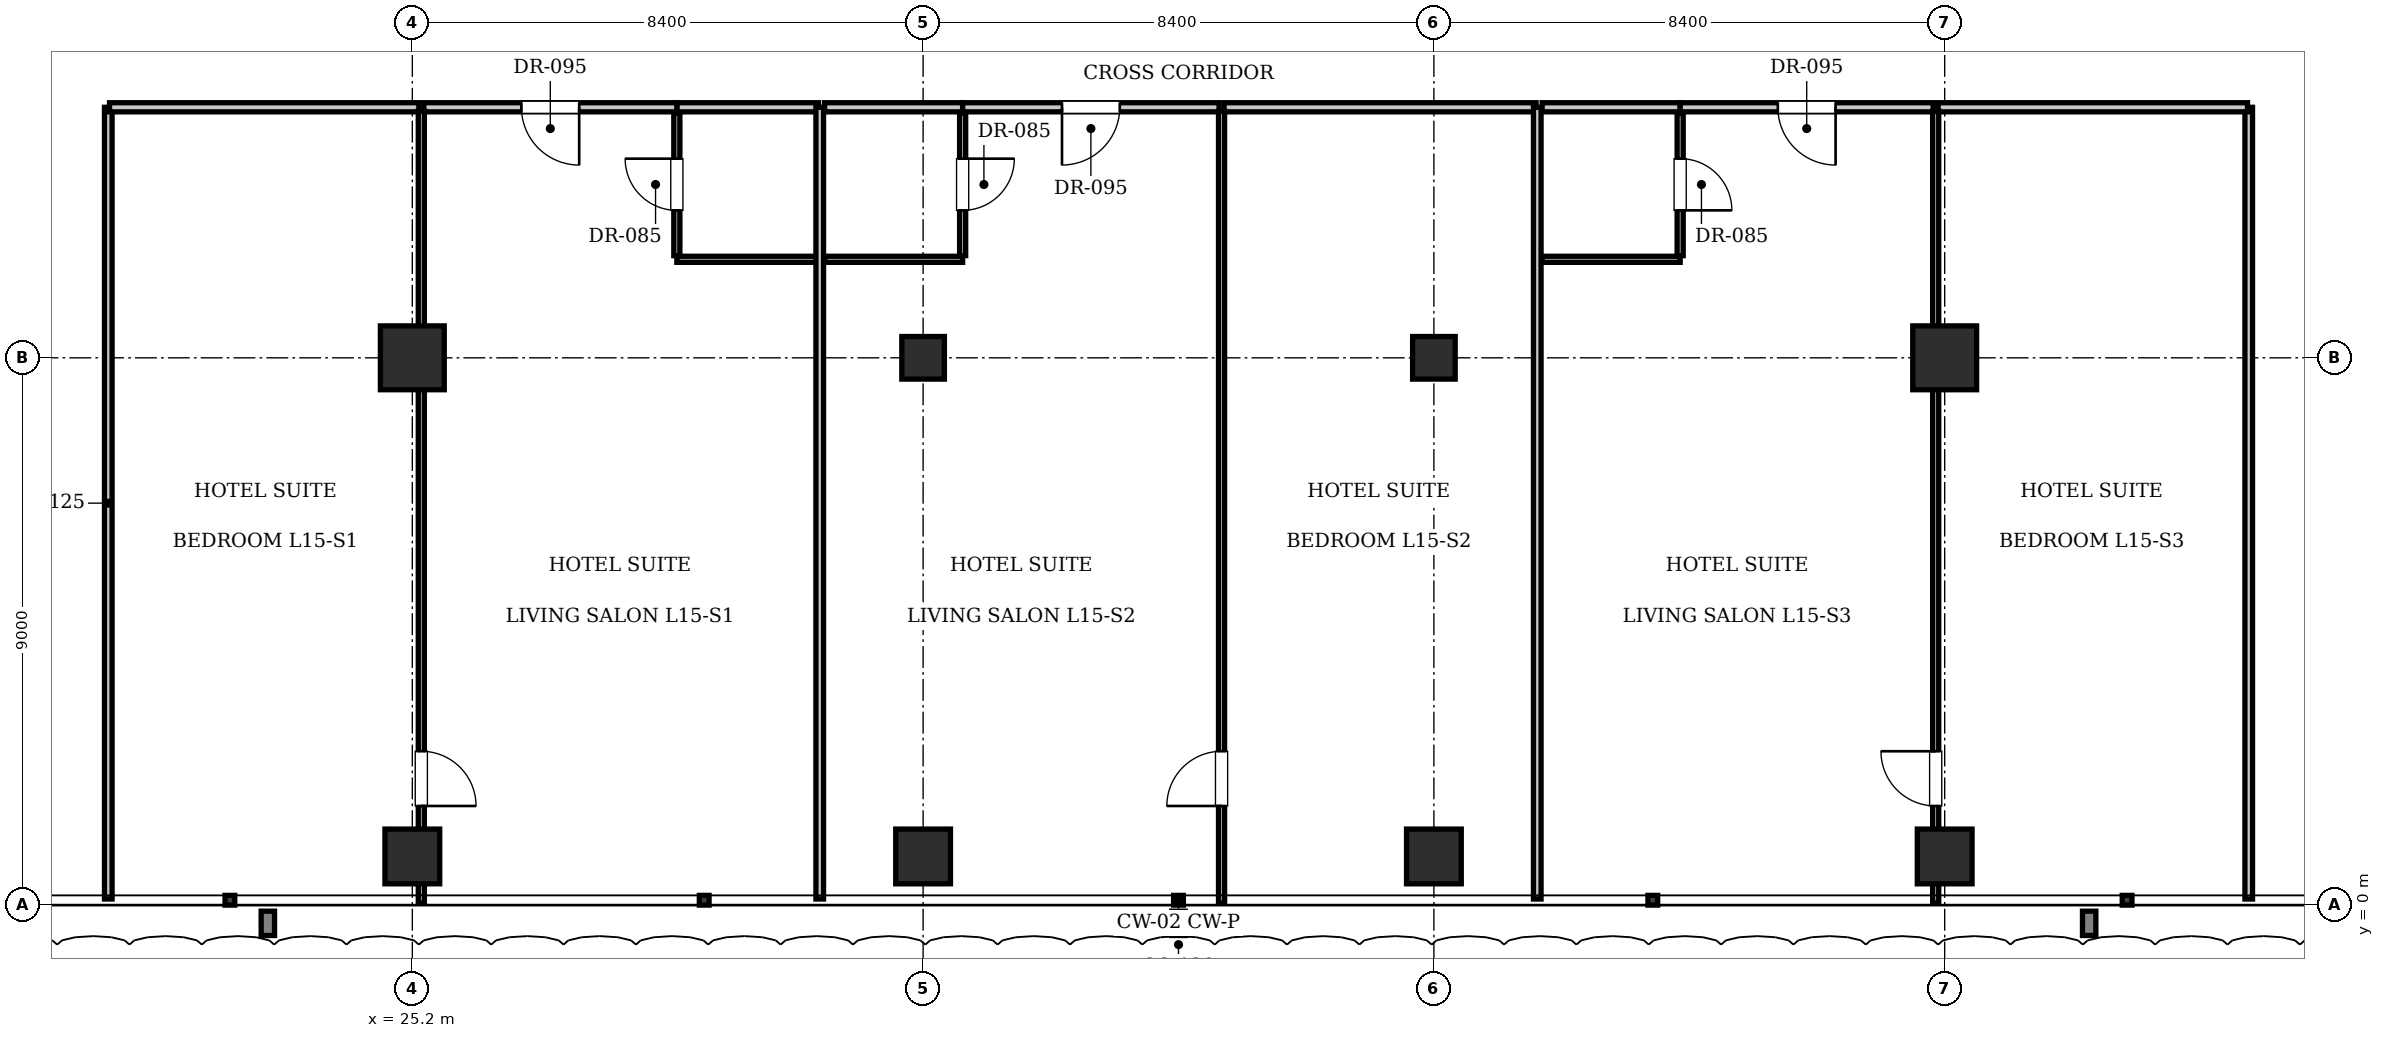
"""IFC4 building model, lengths in metres.
Left out: names, types, materials, properties, quantities, classifications, styles, units other than length and angle.
Written with IfcOpenShell. Run it as: python <this file> out.ifc"""

import sys

from ifc_helpers import new_model, si_unit, direction, frame, frame_2d, origin, origin_2d, place, context, subcontext, project, spatial, rectangle, i_section, extrude, element, fill, save


model = new_model("IFC4")
c1 = context("Model", 3, precision=1e-05, world=origin(), true_north=direction((0.0, 1.0)))
c2 = subcontext(c1, "Body", "Model", "MODEL_VIEW")
j1 = project(units=[si_unit("LENGTHUNIT", "METRE"), si_unit("PLANEANGLEUNIT", "RADIAN")], contexts=[c1])
p1 = place(None, origin())
s1 = spatial("IfcSite", under=j1, at=p1, CompositionType="ELEMENT")
p2 = place(p1, origin())
s2 = spatial("IfcBuilding", under=s1, at=p2, CompositionType="ELEMENT")
p3 = place(p2, frame((0.0, 0.0, 65.45)))
s3 = spatial("IfcBuildingStorey", under=s2, at=p3, CompositionType="ELEMENT", Elevation=65.45)
for number, where, z_axis, x_axis in (
    (1, (25.2, 9.0, 0.0), (0.0, 0.0, 1.0), (1.0, 0.0, 0.0)),
    (2, (50.4, 9.0, 0.0), (0.0, 0.0, 1.0), (1.0, 0.0, 0.0)),
):
    element("IfcColumn", number, at=place(p3, frame(where, z_axis=z_axis, x_axis=x_axis)), inside=s3, PredefinedType="COLUMN", context=c2, shape_type="SweptSolid", body=[
        extrude(rectangle(XDim=1.05, YDim=1.05, at=origin_2d()), origin(), (0.0, 0.0, 1.0), 3.85),
    ])
for number, where, z_axis, x_axis in (
    (3, (33.6, 9.0, 0.0), (0.0, 0.0, 1.0), (1.0, 0.0, 0.0)),
    (4, (42.0, 9.0, 0.0), (0.0, 0.0, 1.0), (1.0, 0.0, 0.0)),
):
    element("IfcColumn", number, at=place(p3, frame(where, z_axis=z_axis, x_axis=x_axis)), inside=s3, PredefinedType="COLUMN", context=c2, shape_type="SweptSolid", body=[
        extrude(i_section(OverallWidth=0.7, OverallDepth=0.7, WebThickness=0.028, FlangeThickness=0.044, at=origin_2d()), origin(), (0.0, 0.0, 1.0), 3.85),
    ])
for number, where, z_axis, x_axis in (
    (5, (25.2, 0.8, 0.0), (0.0, 0.0, 1.0), (1.0, 0.0, 0.0)),
    (6, (33.6, 0.8, 0.0), (0.0, 0.0, 1.0), (1.0, 0.0, 0.0)),
    (7, (42.0, 0.8, 0.0), (0.0, 0.0, 1.0), (1.0, 0.0, 0.0)),
    (8, (50.4, 0.8, 0.0), (0.0, 0.0, 1.0), (1.0, 0.0, 0.0)),
):
    element("IfcColumn", number, at=place(p3, frame(where, z_axis=z_axis, x_axis=x_axis)), inside=s3, PredefinedType="COLUMN", context=c2, shape_type="SweptSolid", body=[
        extrude(rectangle(XDim=0.9, YDim=0.9, at=origin_2d()), origin(), (0.0, 0.0, 1.0), 3.85),
    ])
for number, where, z_axis, x_axis in (
    (9, (20.2, 0.1, 0.0), (0.0, 0.0, 1.0), (0.0, 1.0, 0.0)),
    (10, (55.4, 0.1, 0.0), (0.0, 0.0, 1.0), (0.0, 1.0, 0.0)),
):
    element("IfcWall", number, at=place(p3, frame(where, z_axis=z_axis, x_axis=x_axis)), inside=s3, PredefinedType="PARTITIONING", context=c2, shape_type="SweptSolid", body=[
        extrude(rectangle(XDim=13.02, YDim=0.125, at=frame_2d((6.51, 0.0))), origin(), (0.0, 0.0, 1.0), 3.61),
    ])
p4 = place(p3, frame((29.55, 13.12, 0.0), z_axis=(0.0, 0.0, 1.0), x_axis=(1.0, 0.0, 0.0)))
e11 = element("IfcWall", 11, at=p4, inside=s3, PredefinedType="PARTITIONING", context=c2, shape_type="SweptSolid", body=[
    extrude(rectangle(XDim=2.33, YDim=0.15, at=frame_2d((1.165, 0.0))), origin(), (0.0, 0.0, 1.0), 3.61),
])
p5 = place(p3, frame((29.55, 10.62, 0.0), z_axis=(0.0, 0.0, 1.0), x_axis=(1.0, 0.0, 0.0)))
e12 = element("IfcWall", 12, at=p5, inside=s3, PredefinedType="PARTITIONING", context=c2, shape_type="SweptSolid", body=[
    extrude(rectangle(XDim=2.31, YDim=0.1, at=frame_2d((1.155, 0.0))), origin(), (0.0, 0.0, 1.0), 3.61),
])
p6 = place(p3, frame((29.55, 10.68, 0.0), z_axis=(0.0, 0.0, 1.0), x_axis=(0.0, 1.0, 0.0)))
e13 = element("IfcWall", 13, at=p6, inside=s3, PredefinedType="PARTITIONING", context=c2, shape_type="SweptSolid", body=[
    extrude(rectangle(XDim=2.34, YDim=0.1, at=frame_2d((1.17, 0.0))), origin(), (0.0, 0.0, 1.0), 3.61),
])
p7 = place(p6, frame((0.745, 0.0, 0.0)))
e14 = element("IfcOpeningElement", 14, at=p7, cuts=e13, PredefinedType="OPENING", context=c2, shape_type="SweptSolid", body=[
    extrude(rectangle(XDim=0.85, YDim=2.1, at=frame_2d((0.425, 1.05))), frame((0.0, 0.06, 0.0), z_axis=(0.0, -1.0, 0.0), x_axis=(1.0, 0.0, 0.0)), (0.0, 0.0, 1.0), 0.12),
])
p8 = place(p3, frame((20.22, 13.12, 0.0), z_axis=(0.0, 0.0, 1.0), x_axis=(1.0, 0.0, 0.0)))
e15 = element("IfcWall", 15, at=p8, inside=s3, PredefinedType="PARTITIONING", context=c2, shape_type="SweptSolid", body=[
    extrude(rectangle(XDim=5.088, YDim=0.15, at=frame_2d((2.544, 0.0))), origin(), (0.0, 0.0, 1.0), 3.61),
])
p9 = place(p3, frame((25.388, 13.12, 0.0), z_axis=(0.0, 0.0, 1.0), x_axis=(1.0, 0.0, 0.0)))
e16 = element("IfcWall", 16, at=p9, inside=s3, PredefinedType="PARTITIONING", context=c2, shape_type="SweptSolid", body=[
    extrude(rectangle(XDim=4.162, YDim=0.15, at=frame_2d((2.081, 0.0))), origin(), (0.0, 0.0, 1.0), 3.61),
])
p10 = place(p9, frame((1.606, 0.0, 0.0)))
e17 = element("IfcOpeningElement", 17, at=p10, cuts=e16, PredefinedType="OPENING", context=c2, shape_type="SweptSolid", body=[
    extrude(rectangle(XDim=0.95, YDim=2.15, at=frame_2d((0.475, 1.075))), frame((0.0, 0.085, 0.0), z_axis=(0.0, -1.0, 0.0), x_axis=(1.0, 0.0, 0.0)), (0.0, 0.0, 1.0), 0.17),
])
p11 = place(p3, frame((25.348, 0.03, 0.0), z_axis=(0.0, 0.0, 1.0), x_axis=(0.0, 1.0, 0.0)))
e18 = element("IfcWall", 18, at=p11, inside=s3, PredefinedType="PARTITIONING", context=c2, shape_type="SweptSolid", body=[
    extrude(rectangle(XDim=13.03, YDim=0.1, at=frame_2d((6.515, 0.0))), origin(), (0.0, 0.0, 1.0), 2.988),
])
p12 = place(p11, frame((1.6, 0.0, 0.0)))
e19 = element("IfcOpeningElement", 19, at=p12, cuts=e18, PredefinedType="OPENING", context=c2, shape_type="SweptSolid", body=[
    extrude(rectangle(XDim=0.9, YDim=2.1, at=frame_2d((0.45, 1.05))), frame((0.0, 0.06, 0.0), z_axis=(0.0, -1.0, 0.0), x_axis=(1.0, 0.0, 0.0)), (0.0, 0.0, 1.0), 0.12),
])
p13 = place(p3, frame((31.9, 0.1, 0.0), z_axis=(0.0, 0.0, 1.0), x_axis=(0.0, 1.0, 0.0)))
e20 = element("IfcWall", 20, at=p13, inside=s3, PredefinedType="PARTITIONING", context=c2, shape_type="SweptSolid", body=[
    extrude(rectangle(XDim=13.02, YDim=0.125, at=frame_2d((6.51, 0.0))), origin(), (0.0, 0.0, 1.0), 3.61),
])
p14 = place(p3, frame((31.98, 13.12, 0.0), z_axis=(0.0, 0.0, 1.0), x_axis=(1.0, 0.0, 0.0)))
e21 = element("IfcWall", 21, at=p14, inside=s3, PredefinedType="PARTITIONING", context=c2, shape_type="SweptSolid", body=[
    extrude(rectangle(XDim=2.27, YDim=0.15, at=frame_2d((1.135, 0.0))), origin(), (0.0, 0.0, 1.0), 3.61),
])
p15 = place(p3, frame((31.98, 10.62, 0.0), z_axis=(0.0, 0.0, 1.0), x_axis=(1.0, 0.0, 0.0)))
e22 = element("IfcWall", 22, at=p15, inside=s3, PredefinedType="PARTITIONING", context=c2, shape_type="SweptSolid", body=[
    extrude(rectangle(XDim=2.27, YDim=0.1, at=frame_2d((1.135, 0.0))), origin(), (0.0, 0.0, 1.0), 3.61),
])
p16 = place(p3, frame((34.25, 10.68, 0.0), z_axis=(0.0, 0.0, 1.0), x_axis=(0.0, 1.0, 0.0)))
e23 = element("IfcWall", 23, at=p16, inside=s3, PredefinedType="PARTITIONING", context=c2, shape_type="SweptSolid", body=[
    extrude(rectangle(XDim=2.34, YDim=0.1, at=frame_2d((1.17, 0.0))), origin(), (0.0, 0.0, 1.0), 3.61),
])
p17 = place(p16, frame((0.745, 0.0, 0.0)))
e24 = element("IfcOpeningElement", 24, at=p17, cuts=e23, PredefinedType="OPENING", context=c2, shape_type="SweptSolid", body=[
    extrude(rectangle(XDim=0.85, YDim=2.1, at=frame_2d((0.425, 1.05))), frame((0.0, 0.06, 0.0), z_axis=(0.0, -1.0, 0.0), x_axis=(1.0, 0.0, 0.0)), (0.0, 0.0, 1.0), 0.12),
])
p18 = place(p3, frame((34.25, 13.12, 0.0), z_axis=(0.0, 0.0, 1.0), x_axis=(1.0, 0.0, 0.0)))
e25 = element("IfcWall", 25, at=p18, inside=s3, PredefinedType="PARTITIONING", context=c2, shape_type="SweptSolid", body=[
    extrude(rectangle(XDim=4.218, YDim=0.15, at=frame_2d((2.109, 0.0))), origin(), (0.0, 0.0, 1.0), 3.61),
])
p19 = place(p18, frame((1.634, 0.0, 0.0)))
e26 = element("IfcOpeningElement", 26, at=p19, cuts=e25, PredefinedType="OPENING", context=c2, shape_type="SweptSolid", body=[
    extrude(rectangle(XDim=0.95, YDim=2.15, at=frame_2d((0.475, 1.075))), frame((0.0, 0.085, 0.0), z_axis=(0.0, -1.0, 0.0), x_axis=(1.0, 0.0, 0.0)), (0.0, 0.0, 1.0), 0.17),
])
p20 = place(p3, frame((38.548, 13.12, 0.0), z_axis=(0.0, 0.0, 1.0), x_axis=(1.0, 0.0, 0.0)))
e27 = element("IfcWall", 27, at=p20, inside=s3, PredefinedType="PARTITIONING", context=c2, shape_type="SweptSolid", body=[
    extrude(rectangle(XDim=5.132, YDim=0.15, at=frame_2d((2.566, 0.0))), origin(), (0.0, 0.0, 1.0), 3.61),
])
p21 = place(p3, frame((38.508, 0.03, 0.0), z_axis=(0.0, 0.0, 1.0), x_axis=(0.0, 1.0, 0.0)))
e28 = element("IfcWall", 28, at=p21, inside=s3, PredefinedType="PARTITIONING", context=c2, shape_type="SweptSolid", body=[
    extrude(rectangle(XDim=13.03, YDim=0.1, at=frame_2d((6.515, 0.0))), origin(), (0.0, 0.0, 1.0), 3.61),
])
p22 = place(p21, frame((1.6, 0.0, 0.0)))
e29 = element("IfcOpeningElement", 29, at=p22, cuts=e28, PredefinedType="OPENING", context=c2, shape_type="SweptSolid", body=[
    extrude(rectangle(XDim=0.9, YDim=2.1, at=frame_2d((0.45, 1.05))), frame((0.0, 0.06, 0.0), z_axis=(0.0, -1.0, 0.0), x_axis=(1.0, 0.0, 0.0)), (0.0, 0.0, 1.0), 0.12),
])
p23 = place(p3, frame((43.7, 0.1, 0.0), z_axis=(0.0, 0.0, 1.0), x_axis=(0.0, 1.0, 0.0)))
e30 = element("IfcWall", 30, at=p23, inside=s3, PredefinedType="PARTITIONING", context=c2, shape_type="SweptSolid", body=[
    extrude(rectangle(XDim=13.02, YDim=0.125, at=frame_2d((6.51, 0.0))), origin(), (0.0, 0.0, 1.0), 3.61),
])
p24 = place(p3, frame((43.78, 13.12, 0.0), z_axis=(0.0, 0.0, 1.0), x_axis=(1.0, 0.0, 0.0)))
e31 = element("IfcWall", 31, at=p24, inside=s3, PredefinedType="PARTITIONING", context=c2, shape_type="SweptSolid", body=[
    extrude(rectangle(XDim=2.27, YDim=0.15, at=frame_2d((1.135, 0.0))), origin(), (0.0, 0.0, 1.0), 3.61),
])
p25 = place(p3, frame((43.78, 10.62, 0.0), z_axis=(0.0, 0.0, 1.0), x_axis=(1.0, 0.0, 0.0)))
e32 = element("IfcWall", 32, at=p25, inside=s3, PredefinedType="PARTITIONING", context=c2, shape_type="SweptSolid", body=[
    extrude(rectangle(XDim=2.27, YDim=0.1, at=frame_2d((1.135, 0.0))), origin(), (0.0, 0.0, 1.0), 3.61),
])
p26 = place(p3, frame((46.05, 10.68, 0.0), z_axis=(0.0, 0.0, 1.0), x_axis=(0.0, 1.0, 0.0)))
e33 = element("IfcWall", 33, at=p26, inside=s3, PredefinedType="PARTITIONING", context=c2, shape_type="SweptSolid", body=[
    extrude(rectangle(XDim=2.34, YDim=0.1, at=frame_2d((1.17, 0.0))), origin(), (0.0, 0.0, 1.0), 3.61),
])
p27 = place(p26, frame((0.745, 0.0, 0.0)))
e34 = element("IfcOpeningElement", 34, at=p27, cuts=e33, PredefinedType="OPENING", context=c2, shape_type="SweptSolid", body=[
    extrude(rectangle(XDim=0.85, YDim=2.1, at=frame_2d((0.425, 1.05))), frame((0.0, 0.06, 0.0), z_axis=(0.0, -1.0, 0.0), x_axis=(1.0, 0.0, 0.0)), (0.0, 0.0, 1.0), 0.12),
])
p28 = place(p3, frame((46.05, 13.12, 0.0), z_axis=(0.0, 0.0, 1.0), x_axis=(1.0, 0.0, 0.0)))
e35 = element("IfcWall", 35, at=p28, inside=s3, PredefinedType="PARTITIONING", context=c2, shape_type="SweptSolid", body=[
    extrude(rectangle(XDim=4.162, YDim=0.15, at=frame_2d((2.081, 0.0))), origin(), (0.0, 0.0, 1.0), 3.61),
])
p29 = place(p28, frame((1.606, 0.0, 0.0)))
e36 = element("IfcOpeningElement", 36, at=p29, cuts=e35, PredefinedType="OPENING", context=c2, shape_type="SweptSolid", body=[
    extrude(rectangle(XDim=0.95, YDim=2.15, at=frame_2d((0.475, 1.075))), frame((0.0, 0.085, 0.0), z_axis=(0.0, -1.0, 0.0), x_axis=(1.0, 0.0, 0.0)), (0.0, 0.0, 1.0), 0.17),
])
p30 = place(p3, frame((50.292, 13.12, 0.0), z_axis=(0.0, 0.0, 1.0), x_axis=(1.0, 0.0, 0.0)))
e37 = element("IfcWall", 37, at=p30, inside=s3, PredefinedType="PARTITIONING", context=c2, shape_type="SweptSolid", body=[
    extrude(rectangle(XDim=5.088, YDim=0.15, at=frame_2d((2.544, 0.0))), origin(), (0.0, 0.0, 1.0), 3.61),
])
p31 = place(p3, frame((50.252, 0.03, 0.0), z_axis=(0.0, 0.0, 1.0), x_axis=(0.0, 1.0, 0.0)))
e38 = element("IfcWall", 38, at=p31, inside=s3, PredefinedType="PARTITIONING", context=c2, shape_type="SweptSolid", body=[
    extrude(rectangle(XDim=13.03, YDim=0.1, at=frame_2d((6.515, 0.0))), origin(), (0.0, 0.0, 1.0), 2.988),
])
p32 = place(p31, frame((1.6, 0.0, 0.0)))
e39 = element("IfcOpeningElement", 39, at=p32, cuts=e38, PredefinedType="OPENING", context=c2, shape_type="SweptSolid", body=[
    extrude(rectangle(XDim=0.9, YDim=2.1, at=frame_2d((0.45, 1.05))), frame((0.0, 0.06, 0.0), z_axis=(0.0, -1.0, 0.0), x_axis=(1.0, 0.0, 0.0)), (0.0, 0.0, 1.0), 0.12),
])
p33 = place(p7, origin())
e40 = element("IfcDoor", 40, at=p33, inside=s3, OperationType="SINGLE_SWING_RIGHT", PredefinedType="DOOR", context=c2, shape_type="SweptSolid", body=[
    extrude(rectangle(XDim=0.85, YDim=2.1, at=frame_2d((0.425, 1.05))), frame((0.0, 0.025, 0.0), z_axis=(0.0, -1.0, 0.0), x_axis=(1.0, 0.0, 0.0)), (0.0, 0.0, 1.0), 0.05),
])
fill(e14, e40)
p34 = place(p10, frame((0.95, 0.0, 0.0), z_axis=(0.0, 0.0, 1.0), x_axis=(-1.0, 0.0, 0.0)))
e41 = element("IfcDoor", 41, at=p34, inside=s3, OperationType="SINGLE_SWING_LEFT", PredefinedType="DOOR", context=c2, shape_type="SweptSolid", body=[
    extrude(rectangle(XDim=0.95, YDim=2.15, at=frame_2d((0.475, 1.075))), frame((0.0, 0.025, 0.0), z_axis=(0.0, -1.0, 0.0), x_axis=(1.0, 0.0, 0.0)), (0.0, 0.0, 1.0), 0.05),
])
fill(e17, e41)
p35 = place(p12, frame((0.9, 0.0, 0.0), z_axis=(0.0, 0.0, 1.0), x_axis=(-1.0, 0.0, 0.0)))
e42 = element("IfcDoor", 42, at=p35, inside=s3, OperationType="SINGLE_SWING_RIGHT", PredefinedType="DOOR", context=c2, shape_type="SweptSolid", body=[
    extrude(rectangle(XDim=0.9, YDim=2.1, at=frame_2d((0.45, 1.05))), frame((0.0, 0.025, 0.0), z_axis=(0.0, -1.0, 0.0), x_axis=(1.0, 0.0, 0.0)), (0.0, 0.0, 1.0), 0.05),
])
fill(e19, e42)
p36 = place(p17, frame((0.85, 0.0, 0.0), z_axis=(0.0, 0.0, 1.0), x_axis=(-1.0, 0.0, 0.0)))
e43 = element("IfcDoor", 43, at=p36, inside=s3, OperationType="SINGLE_SWING_LEFT", PredefinedType="DOOR", context=c2, shape_type="SweptSolid", body=[
    extrude(rectangle(XDim=0.85, YDim=2.1, at=frame_2d((0.425, 1.05))), frame((0.0, 0.025, 0.0), z_axis=(0.0, -1.0, 0.0), x_axis=(1.0, 0.0, 0.0)), (0.0, 0.0, 1.0), 0.05),
])
fill(e24, e43)
p37 = place(p19, frame((0.95, 0.0, 0.0), z_axis=(0.0, 0.0, 1.0), x_axis=(-1.0, 0.0, 0.0)))
e44 = element("IfcDoor", 44, at=p37, inside=s3, OperationType="SINGLE_SWING_RIGHT", PredefinedType="DOOR", context=c2, shape_type="SweptSolid", body=[
    extrude(rectangle(XDim=0.95, YDim=2.15, at=frame_2d((0.475, 1.075))), frame((0.0, 0.025, 0.0), z_axis=(0.0, -1.0, 0.0), x_axis=(1.0, 0.0, 0.0)), (0.0, 0.0, 1.0), 0.05),
])
fill(e26, e44)
p38 = place(p22, origin())
e45 = element("IfcDoor", 45, at=p38, inside=s3, OperationType="SINGLE_SWING_LEFT", PredefinedType="DOOR", context=c2, shape_type="SweptSolid", body=[
    extrude(rectangle(XDim=0.9, YDim=2.1, at=frame_2d((0.45, 1.05))), frame((0.0, 0.025, 0.0), z_axis=(0.0, -1.0, 0.0), x_axis=(1.0, 0.0, 0.0)), (0.0, 0.0, 1.0), 0.05),
])
fill(e29, e45)
p39 = place(p27, frame((0.85, 0.0, 0.0), z_axis=(0.0, 0.0, 1.0), x_axis=(-1.0, 0.0, 0.0)))
e46 = element("IfcDoor", 46, at=p39, inside=s3, OperationType="SINGLE_SWING_RIGHT", PredefinedType="DOOR", context=c2, shape_type="SweptSolid", body=[
    extrude(rectangle(XDim=0.85, YDim=2.1, at=frame_2d((0.425, 1.05))), frame((0.0, 0.025, 0.0), z_axis=(0.0, -1.0, 0.0), x_axis=(1.0, 0.0, 0.0)), (0.0, 0.0, 1.0), 0.05),
])
fill(e34, e46)
p40 = place(p29, frame((0.95, 0.0, 0.0), z_axis=(0.0, 0.0, 1.0), x_axis=(-1.0, 0.0, 0.0)))
e47 = element("IfcDoor", 47, at=p40, inside=s3, OperationType="SINGLE_SWING_LEFT", PredefinedType="DOOR", context=c2, shape_type="SweptSolid", body=[
    extrude(rectangle(XDim=0.95, YDim=2.15, at=frame_2d((0.475, 1.075))), frame((0.0, 0.025, 0.0), z_axis=(0.0, -1.0, 0.0), x_axis=(1.0, 0.0, 0.0)), (0.0, 0.0, 1.0), 0.05),
])
fill(e36, e47)
p41 = place(p32, origin())
e48 = element("IfcDoor", 48, at=p41, inside=s3, OperationType="SINGLE_SWING_RIGHT", PredefinedType="DOOR", context=c2, shape_type="SweptSolid", body=[
    extrude(rectangle(XDim=0.9, YDim=2.1, at=frame_2d((0.45, 1.05))), frame((0.0, 0.025, 0.0), z_axis=(0.0, -1.0, 0.0), x_axis=(1.0, 0.0, 0.0)), (0.0, 0.0, 1.0), 0.05),
])
fill(e39, e48)
save(model, sys.argv[1])
